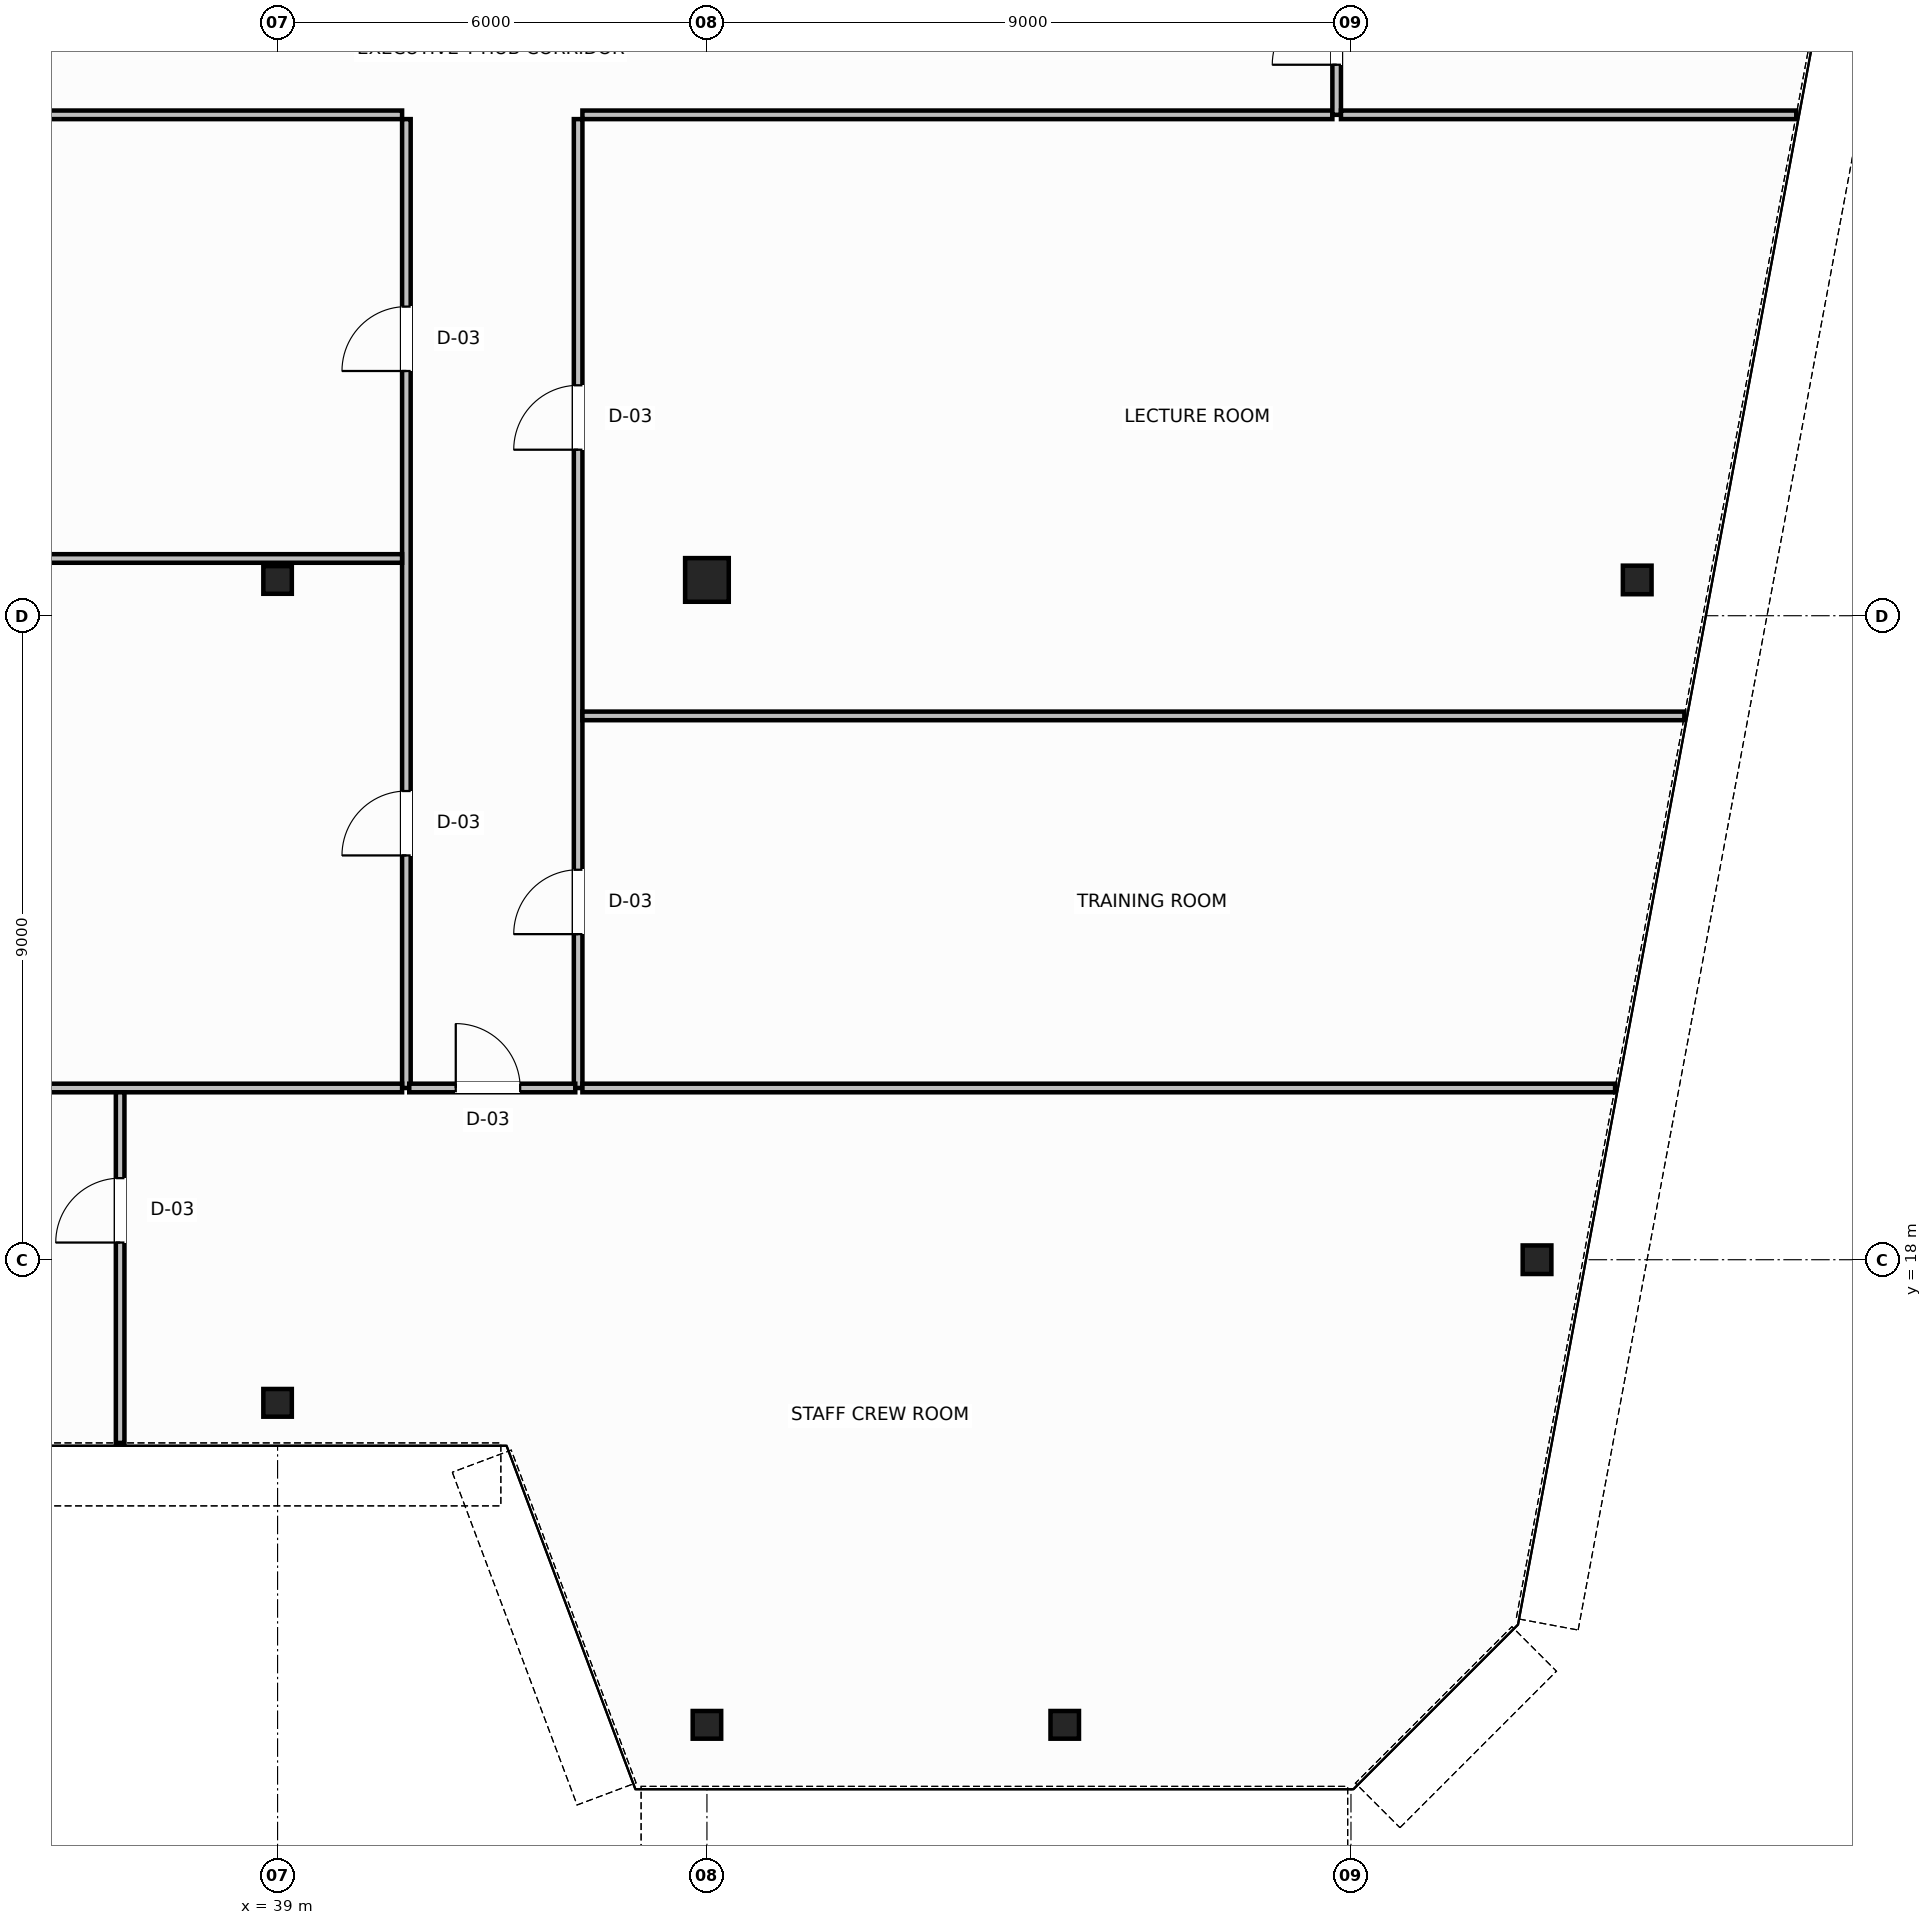
"""IFC4 building model, lengths in metres.
Left out: names, types, materials, properties, quantities, classifications, styles, units other than length and angle.
Written with IfcOpenShell. Run it as: python <this file> out.ifc"""

import sys

from ifc_helpers import new_model, si_unit, direction, frame, frame_2d, origin, origin_2d, place, context, subcontext, project, spatial, rectangle, hollow_circle, i_section, extrude, source, transform, mapped, element, fill, save


model = new_model("IFC4")
c1 = context("Model", 3, precision=1e-05, world=origin(), true_north=direction((0.0, 1.0)))
c2 = subcontext(c1, "Body", "Model", "MODEL_VIEW")
j1 = project(units=[si_unit("LENGTHUNIT", "METRE"), si_unit("PLANEANGLEUNIT", "RADIAN")], contexts=[c1])
p1 = place(None, origin())
s1 = spatial("IfcSite", under=j1, at=p1, CompositionType="ELEMENT")
p2 = place(p1, origin())
s2 = spatial("IfcBuilding", under=s1, at=p2, CompositionType="ELEMENT")
p3 = place(p2, frame((0.0, 0.0, 253.6)))
s3 = spatial("IfcBuildingStorey", under=s2, at=p3, CompositionType="ELEMENT", Elevation=253.6)
m1 = source(origin(), c2, "Body", "SweptSolid", [
    extrude(i_section(OverallWidth=0.401, OverallDepth=0.399, WebThickness=0.025, FlangeThickness=0.035, FilletRadius=0.015, at=origin_2d()), origin(), (0.0, 0.0, 1.0), 3.8),
])
for number, where, z_axis, x_axis in (
    (1, (58.0, 27.5, 0.0), (0.0, 0.0, 1.0), (1.0, 0.0, 0.0)),
    (2, (56.6, 18.0, 0.0), (0.0, 0.0, 1.0), (1.0, 0.0, 0.0)),
):
    element("IfcColumn", number, at=place(p3, frame(where, z_axis=z_axis, x_axis=x_axis)), inside=s3, PredefinedType="COLUMN", context=c2, shape_type="MappedRepresentation", body=[
        mapped(m1, transform((0.0, 0.0, 0.0), scale=1.0)),
    ])
m2 = source(origin(), c2, "Body", "SweptSolid", [
    extrude(i_section(OverallWidth=0.398, OverallDepth=0.387, WebThickness=0.021, FlangeThickness=0.029, FilletRadius=0.015, at=origin_2d()), origin(), (0.0, 0.0, 1.0), 3.8),
])
p4 = place(p3, frame((39.0, 27.5, 0.0), z_axis=(0.0, 0.0, 1.0), x_axis=(1.0, 0.0, 0.0)))
e3 = element("IfcColumn", 3, at=p4, inside=s3, PredefinedType="COLUMN", context=c2, shape_type="MappedRepresentation", body=[
    mapped(m2, transform((0.0, 0.0, 0.0), scale=1.0)),
])
m3 = source(origin(), c2, "Body", "SweptSolid", [
    extrude(hollow_circle(Radius=0.305, WallThickness=0.03, at=origin_2d()), origin(), (0.0, 0.0, 1.0), 3.8),
])
p5 = place(p3, frame((45.0, 27.5, 0.0), z_axis=(0.0, 0.0, 1.0), x_axis=(1.0, 0.0, 0.0)))
e4 = element("IfcColumn", 4, at=p5, inside=s3, PredefinedType="COLUMN", context=c2, shape_type="MappedRepresentation", body=[
    mapped(m3, transform((0.0, 0.0, 0.0), scale=1.0)),
])
for number, where, z_axis, x_axis in (
    (5, (39.0, 16.0, 0.0), (0.0, 0.0, 1.0), (1.0, 0.0, 0.0)),
    (6, (45.0, 11.5, 0.0), (0.0, 0.0, 1.0), (1.0, 0.0, 0.0)),
    (7, (50.0, 11.5, 0.0), (0.0, 0.0, 1.0), (1.0, 0.0, 0.0)),
):
    element("IfcColumn", number, at=place(p3, frame(where, z_axis=z_axis, x_axis=x_axis)), inside=s3, PredefinedType="COLUMN", context=c2, shape_type="MappedRepresentation", body=[
        mapped(m2, transform((0.0, 0.0, 0.0), scale=1.0)),
    ])
p6 = place(p3, frame((14.26, 34.0, 0.0), z_axis=(0.0, 0.0, 1.0), x_axis=(1.0, 0.0, 0.0)))
e8 = element("IfcWall", 8, at=p6, inside=s3, PredefinedType="PARTITIONING", context=c2, shape_type="SweptSolid", body=[
    extrude(rectangle(XDim=26.48, YDim=0.12, at=frame_2d((13.24, 0.0))), origin(), (0.0, 0.0, 1.0), 3.58),
])
p7 = place(p3, frame((43.26, 34.0, 0.0), z_axis=(0.0, 0.0, 1.0), x_axis=(1.0, 0.0, 0.0)))
e9 = element("IfcWall", 9, at=p7, inside=s3, PredefinedType="PARTITIONING", context=c2, shape_type="SweptSolid", body=[
    extrude(rectangle(XDim=10.48, YDim=0.12, at=frame_2d((5.24, 0.0))), origin(), (0.0, 0.0, 1.0), 3.58),
])
p8 = place(p3, frame((53.8, 34.0, 0.0), z_axis=(0.0, 0.0, 1.0), x_axis=(0.0, 1.0, 0.0)))
e10 = element("IfcWall", 10, at=p8, inside=s3, PredefinedType="PARTITIONING", context=c2, shape_type="SweptSolid", body=[
    extrude(rectangle(XDim=2.44, YDim=0.12, at=frame_2d((1.22, 0.0))), origin(), (0.0, 0.0, 1.0), 3.58),
])
p9 = place(p8, frame((0.7, 0.0, 0.0)))
e11 = element("IfcOpeningElement", 11, at=p9, cuts=e10, PredefinedType="OPENING", context=c2, shape_type="SweptSolid", body=[
    extrude(rectangle(XDim=0.9, YDim=2.15, at=frame_2d((0.45, 1.075))), frame((0.0, 0.07, 0.0), z_axis=(0.0, -1.0, 0.0), x_axis=(1.0, 0.0, 0.0)), (0.0, 0.0, 1.0), 0.14),
])
p10 = place(p3, frame((40.8, 20.4, 0.0), z_axis=(0.0, 0.0, 1.0), x_axis=(0.0, 1.0, 0.0)))
e12 = element("IfcWall", 12, at=p10, inside=s3, PredefinedType="PARTITIONING", context=c2, shape_type="SweptSolid", body=[
    extrude(rectangle(XDim=13.54, YDim=0.12, at=frame_2d((6.77, 0.0))), origin(), (0.0, 0.0, 1.0), 3.58),
])
p11 = place(p10, frame((3.25, 0.0, 0.0)))
e13 = element("IfcOpeningElement", 13, at=p11, cuts=e12, PredefinedType="OPENING", context=c2, shape_type="SweptSolid", body=[
    extrude(rectangle(XDim=0.9, YDim=2.15, at=frame_2d((0.45, 1.075))), frame((0.0, 0.07, 0.0), z_axis=(0.0, -1.0, 0.0), x_axis=(1.0, 0.0, 0.0)), (0.0, 0.0, 1.0), 0.14),
])
p12 = place(p10, frame((10.02, 0.0, 0.0)))
e14 = element("IfcOpeningElement", 14, at=p12, cuts=e12, PredefinedType="OPENING", context=c2, shape_type="SweptSolid", body=[
    extrude(rectangle(XDim=0.9, YDim=2.15, at=frame_2d((0.45, 1.075))), frame((0.0, 0.07, 0.0), z_axis=(0.0, -1.0, 0.0), x_axis=(1.0, 0.0, 0.0)), (0.0, 0.0, 1.0), 0.14),
])
p13 = place(p3, frame((43.2, 20.4, 0.0), z_axis=(0.0, 0.0, 1.0), x_axis=(0.0, 1.0, 0.0)))
e15 = element("IfcWall", 15, at=p13, inside=s3, PredefinedType="PARTITIONING", context=c2, shape_type="SweptSolid", body=[
    extrude(rectangle(XDim=13.54, YDim=0.12, at=frame_2d((6.77, 0.0))), origin(), (0.0, 0.0, 1.0), 3.58),
])
p14 = place(p13, frame((2.15, 0.0, 0.0)))
e16 = element("IfcOpeningElement", 16, at=p14, cuts=e15, PredefinedType="OPENING", context=c2, shape_type="SweptSolid", body=[
    extrude(rectangle(XDim=0.9, YDim=2.15, at=frame_2d((0.45, 1.075))), frame((0.0, 0.07, 0.0), z_axis=(0.0, -1.0, 0.0), x_axis=(1.0, 0.0, 0.0)), (0.0, 0.0, 1.0), 0.14),
])
p15 = place(p13, frame((8.92, 0.0, 0.0)))
e17 = element("IfcOpeningElement", 17, at=p15, cuts=e15, PredefinedType="OPENING", context=c2, shape_type="SweptSolid", body=[
    extrude(rectangle(XDim=0.9, YDim=2.15, at=frame_2d((0.45, 1.075))), frame((0.0, 0.07, 0.0), z_axis=(0.0, -1.0, 0.0), x_axis=(1.0, 0.0, 0.0)), (0.0, 0.0, 1.0), 0.14),
])
p16 = place(p3, frame((40.84, 20.4, 0.0), z_axis=(0.0, 0.0, 1.0), x_axis=(1.0, 0.0, 0.0)))
e18 = element("IfcWall", 18, at=p16, inside=s3, PredefinedType="PARTITIONING", context=c2, shape_type="SweptSolid", body=[
    extrude(rectangle(XDim=2.32, YDim=0.12, at=frame_2d((1.16, 0.0))), origin(), (0.0, 0.0, 1.0), 3.58),
])
p17 = place(p16, frame((0.65, 0.0, 0.0)))
e19 = element("IfcOpeningElement", 19, at=p17, cuts=e18, PredefinedType="OPENING", context=c2, shape_type="SweptSolid", body=[
    extrude(rectangle(XDim=0.9, YDim=2.15, at=frame_2d((0.45, 1.075))), frame((0.0, 0.07, 0.0), z_axis=(0.0, -1.0, 0.0), x_axis=(1.0, 0.0, 0.0)), (0.0, 0.0, 1.0), 0.14),
])
p18 = place(p3, frame((53.86, 34.0, 0.0), z_axis=(0.0, 0.0, 1.0), x_axis=(1.0, 0.0, 0.0)))
e20 = element("IfcWall", 20, at=p18, inside=s3, PredefinedType="PARTITIONING", context=c2, shape_type="SweptSolid", body=[
    extrude(rectangle(XDim=6.363, YDim=0.12, at=frame_2d((3.181, 0.0))), origin(), (0.0, 0.0, 1.0), 3.58),
])
p19 = place(p3, frame((8.932, 27.8, 0.0), z_axis=(0.0, 0.0, 1.0), x_axis=(1.0, 0.0, 0.0)))
e21 = element("IfcWall", 21, at=p19, inside=s3, PredefinedType="PARTITIONING", context=c2, shape_type="SweptSolid", body=[
    extrude(rectangle(XDim=31.808, YDim=0.12, at=frame_2d((15.904, 0.0))), origin(), (0.0, 0.0, 1.0), 3.58),
])
p20 = place(p3, frame((43.26, 25.6, 0.0), z_axis=(0.0, 0.0, 1.0), x_axis=(1.0, 0.0, 0.0)))
e22 = element("IfcWall", 22, at=p20, inside=s3, PredefinedType="PARTITIONING", context=c2, shape_type="SweptSolid", body=[
    extrude(rectangle(XDim=15.399, YDim=0.12, at=frame_2d((7.699, 0.0))), origin(), (0.0, 0.0, 1.0), 3.58),
])
p21 = place(p3, frame((10.31, 20.4, 0.0), z_axis=(0.0, 0.0, 1.0), x_axis=(1.0, 0.0, 0.0)))
e23 = element("IfcWall", 23, at=p21, inside=s3, PredefinedType="PARTITIONING", context=c2, shape_type="SweptSolid", body=[
    extrude(rectangle(XDim=30.43, YDim=0.12, at=frame_2d((15.215, 0.0))), origin(), (0.0, 0.0, 1.0), 3.58),
])
p22 = place(p3, frame((43.26, 20.4, 0.0), z_axis=(0.0, 0.0, 1.0), x_axis=(1.0, 0.0, 0.0)))
e24 = element("IfcWall", 24, at=p22, inside=s3, PredefinedType="PARTITIONING", context=c2, shape_type="SweptSolid", body=[
    extrude(rectangle(XDim=14.43, YDim=0.12, at=frame_2d((7.215, 0.0))), origin(), (0.0, 0.0, 1.0), 3.58),
])
p23 = place(p3, frame((36.8, 15.44, 0.0), z_axis=(0.0, 0.0, 1.0), x_axis=(0.0, 1.0, 0.0)))
e25 = element("IfcWall", 25, at=p23, inside=s3, PredefinedType="PARTITIONING", context=c2, shape_type="SweptSolid", body=[
    extrude(rectangle(XDim=4.9, YDim=0.12, at=frame_2d((2.45, 0.0))), origin(), (0.0, 0.0, 1.0), 3.58),
])
p24 = place(p23, frame((2.8, 0.0, 0.0)))
e26 = element("IfcOpeningElement", 26, at=p24, cuts=e25, PredefinedType="OPENING", context=c2, shape_type="SweptSolid", body=[
    extrude(rectangle(XDim=0.9, YDim=2.15, at=frame_2d((0.45, 1.075))), frame((0.0, 0.07, 0.0), z_axis=(0.0, -1.0, 0.0), x_axis=(1.0, 0.0, 0.0)), (0.0, 0.0, 1.0), 0.14),
])
m4 = source(origin(), c2, "Body", "SweptSolid", [
    extrude(rectangle(XDim=0.9, YDim=2.15, at=frame_2d((0.45, 1.075))), frame((0.0, 0.025, 0.0), z_axis=(0.0, -1.0, 0.0), x_axis=(1.0, 0.0, 0.0)), (0.0, 0.0, 1.0), 0.05),
])
p25 = place(p9, origin())
e27 = element("IfcDoor", 27, at=p25, inside=s3, OperationType="SINGLE_SWING_RIGHT", PredefinedType="DOOR", context=c2, shape_type="MappedRepresentation", body=[
    mapped(m4, transform((0.0, 0.0, 0.0), scale=1.0)),
])
fill(e11, e27)
p26 = place(p11, origin())
e28 = element("IfcDoor", 28, at=p26, inside=s3, OperationType="SINGLE_SWING_LEFT", PredefinedType="DOOR", context=c2, shape_type="MappedRepresentation", body=[
    mapped(m4, transform((0.0, 0.0, 0.0), scale=1.0)),
])
fill(e13, e28)
p27 = place(p12, origin())
e29 = element("IfcDoor", 29, at=p27, inside=s3, OperationType="SINGLE_SWING_RIGHT", PredefinedType="DOOR", context=c2, shape_type="MappedRepresentation", body=[
    mapped(m4, transform((0.0, 0.0, 0.0), scale=1.0)),
])
fill(e14, e29)
p28 = place(p14, origin())
e30 = element("IfcDoor", 30, at=p28, inside=s3, OperationType="SINGLE_SWING_RIGHT", PredefinedType="DOOR", context=c2, shape_type="MappedRepresentation", body=[
    mapped(m4, transform((0.0, 0.0, 0.0), scale=1.0)),
])
fill(e16, e30)
p29 = place(p15, origin())
e31 = element("IfcDoor", 31, at=p29, inside=s3, OperationType="SINGLE_SWING_LEFT", PredefinedType="DOOR", context=c2, shape_type="MappedRepresentation", body=[
    mapped(m4, transform((0.0, 0.0, 0.0), scale=1.0)),
])
fill(e17, e31)
p30 = place(p24, origin())
e32 = element("IfcDoor", 32, at=p30, inside=s3, OperationType="SINGLE_SWING_LEFT", PredefinedType="DOOR", context=c2, shape_type="MappedRepresentation", body=[
    mapped(m4, transform((0.0, 0.0, 0.0), scale=1.0)),
])
fill(e26, e32)
p31 = place(p17, origin())
e33 = element("IfcDoor", 33, at=p31, inside=s3, OperationType="SINGLE_SWING_LEFT", PredefinedType="DOOR", context=c2, shape_type="MappedRepresentation", body=[
    mapped(m4, transform((0.0, 0.0, 0.0), scale=1.0)),
])
fill(e19, e33)
save(model, sys.argv[1])
